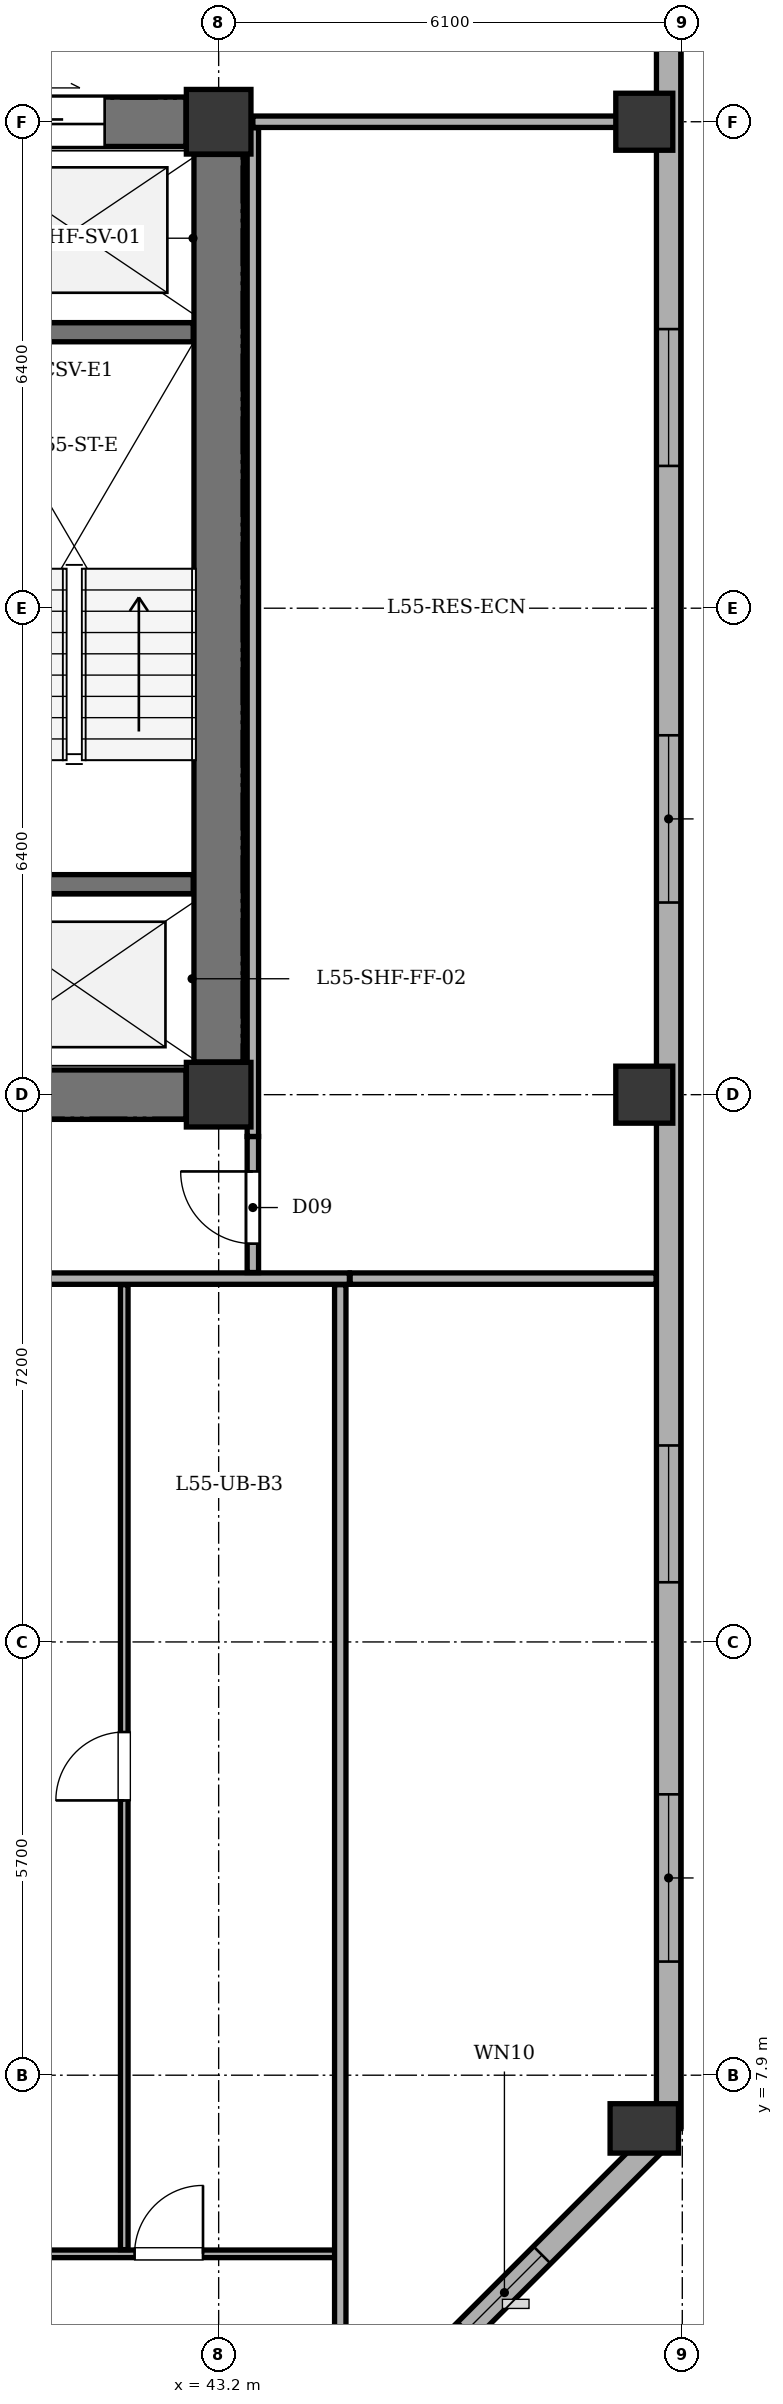
"""IFC4 building model, lengths in metres.
Left out: names, types, materials, properties, quantities, classifications, styles, units other than length and angle.
Written with IfcOpenShell. Run it as: python <this file> out.ifc"""

import sys

from ifc_helpers import new_model, si_unit, direction, frame, frame_2d, origin, origin_2d, place, context, subcontext, project, spatial, rectangle, extrude, element, fill, save


model = new_model("IFC4")
c1 = context("Model", 3, precision=1e-05, world=origin(), true_north=direction((0.0, 1.0)))
c2 = subcontext(c1, "Body", "Model", "MODEL_VIEW")
j1 = project(units=[si_unit("LENGTHUNIT", "METRE"), si_unit("PLANEANGLEUNIT", "RADIAN")], contexts=[c1])
p1 = place(None, origin())
s1 = spatial("IfcSite", under=j1, at=p1, CompositionType="ELEMENT")
p2 = place(p1, origin())
s2 = spatial("IfcBuilding", under=s1, at=p2, CompositionType="ELEMENT")
p3 = place(p2, frame((0.0, 0.0, 214.3)))
s3 = spatial("IfcBuildingStorey", under=s2, at=p3, CompositionType="ELEMENT", Elevation=214.3)
for number, where, z_axis, x_axis in (
    (1, (43.2, 20.8, 0.0), (0.0, 0.0, 1.0), (1.0, 0.0, 0.0)),
    (2, (43.2, 33.6, 0.0), (0.0, 0.0, 1.0), (1.0, 0.0, 0.0)),
):
    element("IfcColumn", number, at=place(p3, frame(where, z_axis=z_axis, x_axis=x_axis)), inside=s3, PredefinedType="COLUMN", context=c2, shape_type="SweptSolid", body=[
        extrude(rectangle(XDim=0.85, YDim=0.85, at=origin_2d()), origin(), (0.0, 0.0, 1.0), 3.4),
    ])
p4 = place(p3, frame((48.8, 7.2, 0.0), z_axis=(0.0, 0.0, 1.0), x_axis=(1.0, 0.0, 0.0)))
e3 = element("IfcColumn", 3, at=p4, inside=s3, PredefinedType="COLUMN", context=c2, shape_type="SweptSolid", body=[
    extrude(rectangle(XDim=0.65, YDim=0.9, at=origin_2d()), origin(), (0.0, 0.0, 1.0), 3.4),
])
for number, where, z_axis, x_axis in (
    (4, (48.8, 20.8, 0.0), (0.0, 0.0, 1.0), (1.0, 0.0, 0.0)),
    (5, (48.8, 33.6, 0.0), (0.0, 0.0, 1.0), (1.0, 0.0, 0.0)),
):
    element("IfcColumn", number, at=place(p3, frame(where, z_axis=z_axis, x_axis=x_axis)), inside=s3, PredefinedType="COLUMN", context=c2, shape_type="SweptSolid", body=[
        extrude(rectangle(XDim=0.75, YDim=0.75, at=origin_2d()), origin(), (0.0, 0.0, 1.0), 3.4),
    ])
p5 = place(p3, frame((49.12, 35.0, 0.0), z_axis=(0.0, 0.0, 1.0), x_axis=(0.0, -1.0, 0.0)))
e6 = element("IfcWall", 6, at=p5, inside=s3, PredefinedType="STANDARD", context=c2, shape_type="SweptSolid", body=[
    extrude(rectangle(XDim=27.8, YDim=0.32, at=frame_2d((13.9, 0.0))), origin(), (0.0, 0.0, 1.0), 2.725),
])
p6 = place(p5, frame((4.128, 0.0, 0.75)))
e7 = element("IfcOpeningElement", 7, at=p6, cuts=e6, PredefinedType="OPENING", context=c2, shape_type="SweptSolid", body=[
    extrude(rectangle(XDim=1.8, YDim=1.7, at=frame_2d((0.9, 0.85))), frame((0.0, 0.17, 0.0), z_axis=(0.0, -1.0, 0.0), x_axis=(1.0, 0.0, 0.0)), (0.0, 0.0, 1.0), 0.34),
])
p7 = place(p5, frame((9.472, 0.0, 0.75)))
e8 = element("IfcOpeningElement", 8, at=p7, cuts=e6, PredefinedType="OPENING", context=c2, shape_type="SweptSolid", body=[
    extrude(rectangle(XDim=2.2, YDim=1.7, at=frame_2d((1.1, 0.85))), frame((0.0, 0.17, 0.0), z_axis=(0.0, -1.0, 0.0), x_axis=(1.0, 0.0, 0.0)), (0.0, 0.0, 1.0), 0.34),
])
p8 = place(p5, frame((18.815, 0.0, 0.75)))
e9 = element("IfcOpeningElement", 9, at=p8, cuts=e6, PredefinedType="OPENING", context=c2, shape_type="SweptSolid", body=[
    extrude(rectangle(XDim=1.8, YDim=1.7, at=frame_2d((0.9, 0.85))), frame((0.0, 0.17, 0.0), z_axis=(0.0, -1.0, 0.0), x_axis=(1.0, 0.0, 0.0)), (0.0, 0.0, 1.0), 0.34),
])
p9 = place(p5, frame((23.405, 0.0, 0.75)))
e10 = element("IfcOpeningElement", 10, at=p9, cuts=e6, PredefinedType="OPENING", context=c2, shape_type="SweptSolid", body=[
    extrude(rectangle(XDim=2.2, YDim=1.7, at=frame_2d((1.1, 0.85))), frame((0.0, 0.17, 0.0), z_axis=(0.0, -1.0, 0.0), x_axis=(1.0, 0.0, 0.0)), (0.0, 0.0, 1.0), 0.34),
])
p10 = place(p3, frame((49.12, 7.2, 0.0), z_axis=(0.0, 0.0, 1.0), x_axis=(-0.707106781187, -0.707106781187, 0.0)))
e11 = element("IfcWall", 11, at=p10, inside=s3, PredefinedType="STANDARD", context=c2, shape_type="SweptSolid", body=[
    extrude(rectangle(XDim=6.11, YDim=0.32, at=frame_2d((3.055, 0.0))), origin(), (0.0, 0.0, 1.0), 2.725),
])
p11 = place(p10, frame((2.355, 0.0, 0.75)))
e12 = element("IfcOpeningElement", 12, at=p11, cuts=e11, PredefinedType="OPENING", context=c2, shape_type="SweptSolid", body=[
    extrude(rectangle(XDim=1.4, YDim=1.65, at=frame_2d((0.7, 0.825))), frame((0.0, 0.17, 0.0), z_axis=(0.0, -1.0, 0.0), x_axis=(1.0, 0.0, 0.0)), (0.0, 0.0, 1.0), 0.34),
])
p12 = place(p3, frame((43.2, 21.23, 0.0), z_axis=(0.0, 0.0, 1.0), x_axis=(0.0, 1.0, 0.0)))
e13 = element("IfcWall", 13, at=p12, inside=s3, PredefinedType="SHEAR", context=c2, shape_type="SweptSolid", body=[
    extrude(rectangle(XDim=11.94, YDim=0.65, at=frame_2d((5.97, 0.0))), origin(), (0.0, 0.0, 1.0), 3.1),
])
p13 = place(p3, frame((35.63, 20.8, 0.0), z_axis=(0.0, 0.0, 1.0), x_axis=(1.0, 0.0, 0.0)))
e14 = element("IfcWall", 14, at=p13, inside=s3, PredefinedType="SHEAR", context=c2, shape_type="SweptSolid", body=[
    extrude(rectangle(XDim=7.14, YDim=0.65, at=frame_2d((3.57, 0.0))), origin(), (0.0, 0.0, 1.0), 3.1),
])
p14 = place(p3, frame((35.63, 33.6, 0.0), z_axis=(0.0, 0.0, 1.0), x_axis=(1.0, 0.0, 0.0)))
e15 = element("IfcWall", 15, at=p14, inside=s3, PredefinedType="SHEAR", context=c2, shape_type="SweptSolid", body=[
    extrude(rectangle(XDim=7.14, YDim=0.65, at=frame_2d((3.57, 0.0))), origin(), (0.0, 0.0, 1.0), 3.1),
])
p15 = place(p14, frame((4.77, 0.0, 0.0)))
e16 = element("IfcOpeningElement", 16, at=p15, cuts=e15, PredefinedType="OPENING", context=c2, shape_type="SweptSolid", body=[
    extrude(rectangle(XDim=1.3, YDim=2.15, at=frame_2d((0.65, 1.075))), frame((0.0, 0.335, 0.0), z_axis=(0.0, -1.0, 0.0), x_axis=(1.0, 0.0, 0.0)), (0.0, 0.0, 1.0), 0.67),
])
p16 = place(p14, frame((2.57, 0.0, 0.0)))
e17 = element("IfcOpeningElement", 17, at=p16, cuts=e15, PredefinedType="OPENING", context=c2, shape_type="SweptSolid", body=[
    extrude(rectangle(XDim=0.85, YDim=2.02, at=frame_2d((0.425, 1.01))), frame((0.0, 0.335, 0.0), z_axis=(0.0, -1.0, 0.0), x_axis=(1.0, 0.0, 0.0)), (0.0, 0.0, 1.0), 0.67),
])
for number, where, z_axis, x_axis in (
    (18, (39.69, 23.57, 0.0), (0.0, 0.0, 1.0), (1.0, 0.0, 0.0)),
    (19, (39.69, 30.83, 0.0), (0.0, 0.0, 1.0), (1.0, 0.0, 0.0)),
):
    element("IfcWall", number, at=place(p3, frame(where, z_axis=z_axis, x_axis=x_axis)), inside=s3, PredefinedType="SHEAR", context=c2, shape_type="SweptSolid", body=[
        extrude(rectangle(XDim=3.175, YDim=0.25, at=frame_2d((1.587, 0.0))), origin(), (0.0, 0.0, 1.0), 3.1),
    ])
p17 = place(p3, frame((10.9, 18.38, 0.0), z_axis=(0.0, 0.0, 1.0), x_axis=(1.0, 0.0, 0.0)))
e20 = element("IfcWall", 20, at=p17, inside=s3, PredefinedType="PARTITIONING", context=c2, shape_type="SweptSolid", body=[
    extrude(rectangle(XDim=34.02, YDim=0.15, at=frame_2d((17.01, 0.0))), origin(), (0.0, 0.0, 1.0), 3.1),
])
p18 = place(p17, frame((7.727, 0.0, 0.0)))
e21 = element("IfcOpeningElement", 21, at=p18, cuts=e20, PredefinedType="OPENING", context=c2, shape_type="SweptSolid", body=[
    extrude(rectangle(XDim=1.0, YDim=2.1, at=frame_2d((0.5, 1.05))), frame((0.0, 0.085, 0.0), z_axis=(0.0, -1.0, 0.0), x_axis=(1.0, 0.0, 0.0)), (0.0, 0.0, 1.0), 0.17),
])
p19 = place(p17, frame((24.617, 0.0, 0.0)))
e22 = element("IfcOpeningElement", 22, at=p19, cuts=e20, PredefinedType="OPENING", context=c2, shape_type="SweptSolid", body=[
    extrude(rectangle(XDim=1.0, YDim=2.1, at=frame_2d((0.5, 1.05))), frame((0.0, 0.085, 0.0), z_axis=(0.0, -1.0, 0.0), x_axis=(1.0, 0.0, 0.0)), (0.0, 0.0, 1.0), 0.17),
])
p20 = place(p3, frame((27.314, 5.55, 0.0), z_axis=(0.0, 0.0, 1.0), x_axis=(1.0, 0.0, 0.0)))
e23 = element("IfcWall", 23, at=p20, inside=s3, PredefinedType="PARTITIONING", context=c2, shape_type="SweptSolid", body=[
    extrude(rectangle(XDim=17.526, YDim=0.1, at=frame_2d((8.763, 0.0))), origin(), (0.0, 0.0, 1.0), 3.1),
])
p21 = place(p20, frame((0.65, 0.0, 0.0)))
e24 = element("IfcOpeningElement", 24, at=p21, cuts=e23, PredefinedType="OPENING", context=c2, shape_type="SweptSolid", body=[
    extrude(rectangle(XDim=0.85, YDim=2.05, at=frame_2d((0.425, 1.025))), frame((0.0, 0.06, 0.0), z_axis=(0.0, -1.0, 0.0), x_axis=(1.0, 0.0, 0.0)), (0.0, 0.0, 1.0), 0.12),
])
p22 = place(p20, frame((5.001, 0.0, 0.0)))
e25 = element("IfcOpeningElement", 25, at=p22, cuts=e23, PredefinedType="OPENING", context=c2, shape_type="SweptSolid", body=[
    extrude(rectangle(XDim=0.85, YDim=2.05, at=frame_2d((0.425, 1.025))), frame((0.0, 0.06, 0.0), z_axis=(0.0, -1.0, 0.0), x_axis=(1.0, 0.0, 0.0)), (0.0, 0.0, 1.0), 0.12),
])
p23 = place(p20, frame((10.428, 0.0, 0.0)))
e26 = element("IfcOpeningElement", 26, at=p23, cuts=e23, PredefinedType="OPENING", context=c2, shape_type="SweptSolid", body=[
    extrude(rectangle(XDim=0.9, YDim=2.05, at=frame_2d((0.45, 1.025))), frame((0.0, 0.06, 0.0), z_axis=(0.0, -1.0, 0.0), x_axis=(1.0, 0.0, 0.0)), (0.0, 0.0, 1.0), 0.12),
])
p24 = place(p20, frame((14.78, 0.0, 0.0)))
e27 = element("IfcOpeningElement", 27, at=p24, cuts=e23, PredefinedType="OPENING", context=c2, shape_type="SweptSolid", body=[
    extrude(rectangle(XDim=0.9, YDim=2.05, at=frame_2d((0.45, 1.025))), frame((0.0, 0.06, 0.0), z_axis=(0.0, -1.0, 0.0), x_axis=(1.0, 0.0, 0.0)), (0.0, 0.0, 1.0), 0.12),
])
p25 = place(p3, frame((41.958, 5.605, 0.0), z_axis=(0.0, 0.0, 1.0), x_axis=(0.0, 1.0, 0.0)))
e28 = element("IfcWall", 28, at=p25, inside=s3, PredefinedType="PARTITIONING", context=c2, shape_type="SweptSolid", body=[
    extrude(rectangle(XDim=12.695, YDim=0.1, at=frame_2d((6.348, 0.0))), origin(), (0.0, 0.0, 1.0), 2.725),
])
p26 = place(p25, frame((5.91, 0.0, 0.0)))
e29 = element("IfcOpeningElement", 29, at=p26, cuts=e28, PredefinedType="OPENING", context=c2, shape_type="SweptSolid", body=[
    extrude(rectangle(XDim=0.9, YDim=2.05, at=frame_2d((0.45, 1.025))), frame((0.0, 0.06, 0.0), z_axis=(0.0, -1.0, 0.0), x_axis=(1.0, 0.0, 0.0)), (0.0, 0.0, 1.0), 0.12),
])
p27 = place(p3, frame((44.8, 3.045, 0.0), z_axis=(0.0, 0.0, 1.0), x_axis=(0.0, 1.0, 0.0)))
e30 = element("IfcWall", 30, at=p27, inside=s3, PredefinedType="PARTITIONING", context=c2, shape_type="SweptSolid", body=[
    extrude(rectangle(XDim=15.255, YDim=0.15, at=frame_2d((7.627, 0.0))), origin(), (0.0, 0.0, 1.0), 3.1),
])
p28 = place(p3, frame((44.93, 18.38, 0.0), z_axis=(0.0, 0.0, 1.0), x_axis=(1.0, 0.0, 0.0)))
e31 = element("IfcWall", 31, at=p28, inside=s3, PredefinedType="PARTITIONING", context=c2, shape_type="SweptSolid", body=[
    extrude(rectangle(XDim=4.025, YDim=0.15, at=frame_2d((2.013, 0.0))), origin(), (0.0, 0.0, 1.0), 3.1),
])
p29 = place(p3, frame((43.65, 33.6, 0.0), z_axis=(0.0, 0.0, 1.0), x_axis=(1.0, 0.0, 0.0)))
e32 = element("IfcWall", 32, at=p29, inside=s3, PredefinedType="PARTITIONING", context=c2, shape_type="SweptSolid", body=[
    extrude(rectangle(XDim=5.305, YDim=0.15, at=frame_2d((2.653, 0.0))), origin(), (0.0, 0.0, 1.0), 2.535),
])
p30 = place(p3, frame((43.65, 18.46, 0.0), z_axis=(0.0, 0.0, 1.0), x_axis=(0.0, 1.0, 0.0)))
e33 = element("IfcWall", 33, at=p30, inside=s3, PredefinedType="PARTITIONING", context=c2, shape_type="SweptSolid", body=[
    extrude(rectangle(XDim=1.79, YDim=0.15, at=frame_2d((0.895, 0.0))), origin(), (0.0, 0.0, 1.0), 3.1),
])
p31 = place(p30, frame((0.38, 0.0, 0.0)))
e34 = element("IfcOpeningElement", 34, at=p31, cuts=e33, PredefinedType="OPENING", context=c2, shape_type="SweptSolid", body=[
    extrude(rectangle(XDim=0.95, YDim=2.1, at=frame_2d((0.475, 1.05))), frame((0.0, 0.085, 0.0), z_axis=(0.0, -1.0, 0.0), x_axis=(1.0, 0.0, 0.0)), (0.0, 0.0, 1.0), 0.17),
])
p32 = place(p3, frame((43.65, 20.25, 0.0), z_axis=(0.0, 0.0, 1.0), x_axis=(0.0, 1.0, 0.0)))
e35 = element("IfcWall", 35, at=p32, inside=s3, PredefinedType="PARTITIONING", context=c2, shape_type="SweptSolid", body=[
    extrude(rectangle(XDim=13.27, YDim=0.15, at=frame_2d((6.635, 0.0))), origin(), (0.0, 0.0, 1.0), 3.1),
])
p33 = place(p6, origin())
e36 = element("IfcWindow", 36, at=p33, inside=s3, PartitioningType="SINGLE_PANEL", PredefinedType="WINDOW", context=c2, shape_type="SweptSolid", body=[
    extrude(rectangle(XDim=1.8, YDim=1.7, at=frame_2d((0.9, 0.85))), frame((0.0, -0.01, 0.0), z_axis=(0.0, -1.0, 0.0), x_axis=(1.0, 0.0, 0.0)), (0.0, 0.0, 1.0), 0.06),
])
fill(e7, e36)
p34 = place(p7, origin())
e37 = element("IfcWindow", 37, at=p34, inside=s3, PartitioningType="SINGLE_PANEL", PredefinedType="WINDOW", context=c2, shape_type="SweptSolid", body=[
    extrude(rectangle(XDim=2.2, YDim=1.7, at=frame_2d((1.1, 0.85))), frame((0.0, -0.01, 0.0), z_axis=(0.0, -1.0, 0.0), x_axis=(1.0, 0.0, 0.0)), (0.0, 0.0, 1.0), 0.06),
])
fill(e8, e37)
p35 = place(p8, origin())
e38 = element("IfcWindow", 38, at=p35, inside=s3, PartitioningType="SINGLE_PANEL", PredefinedType="WINDOW", context=c2, shape_type="SweptSolid", body=[
    extrude(rectangle(XDim=1.8, YDim=1.7, at=frame_2d((0.9, 0.85))), frame((0.0, -0.01, 0.0), z_axis=(0.0, -1.0, 0.0), x_axis=(1.0, 0.0, 0.0)), (0.0, 0.0, 1.0), 0.06),
])
fill(e9, e38)
p36 = place(p9, origin())
e39 = element("IfcWindow", 39, at=p36, inside=s3, PartitioningType="SINGLE_PANEL", PredefinedType="WINDOW", context=c2, shape_type="SweptSolid", body=[
    extrude(rectangle(XDim=2.2, YDim=1.7, at=frame_2d((1.1, 0.85))), frame((0.0, -0.01, 0.0), z_axis=(0.0, -1.0, 0.0), x_axis=(1.0, 0.0, 0.0)), (0.0, 0.0, 1.0), 0.06),
])
fill(e10, e39)
p37 = place(p11, origin())
e40 = element("IfcWindow", 40, at=p37, inside=s3, PartitioningType="SINGLE_PANEL", PredefinedType="WINDOW", context=c2, shape_type="SweptSolid", body=[
    extrude(rectangle(XDim=1.4, YDim=1.65, at=frame_2d((0.7, 0.825))), frame((0.0, -0.01, 0.0), z_axis=(0.0, -1.0, 0.0), x_axis=(1.0, 0.0, 0.0)), (0.0, 0.0, 1.0), 0.06),
])
fill(e12, e40)
p38 = place(p15, origin())
e41 = element("IfcDoor", 41, at=p38, inside=s3, OperationType="DOUBLE_DOOR_SLIDING", PredefinedType="DOOR", context=c2, shape_type="SweptSolid", body=[
    extrude(rectangle(XDim=1.3, YDim=2.15, at=frame_2d((0.65, 1.075))), frame((0.0, 0.025, 0.0), z_axis=(0.0, -1.0, 0.0), x_axis=(1.0, 0.0, 0.0)), (0.0, 0.0, 1.0), 0.05),
])
fill(e16, e41)
p39 = place(p26, origin())
e42 = element("IfcDoor", 42, at=p39, inside=s3, OperationType="SINGLE_SWING_LEFT", PredefinedType="DOOR", context=c2, shape_type="SweptSolid", body=[
    extrude(rectangle(XDim=0.9, YDim=2.05, at=frame_2d((0.45, 1.025))), frame((0.0, 0.025, 0.0), z_axis=(0.0, -1.0, 0.0), x_axis=(1.0, 0.0, 0.0)), (0.0, 0.0, 1.0), 0.05),
])
fill(e29, e42)
p40 = place(p24, origin())
e43 = element("IfcDoor", 43, at=p40, inside=s3, OperationType="SINGLE_SWING_RIGHT", PredefinedType="DOOR", context=c2, shape_type="SweptSolid", body=[
    extrude(rectangle(XDim=0.9, YDim=2.05, at=frame_2d((0.45, 1.025))), frame((0.0, 0.025, 0.0), z_axis=(0.0, -1.0, 0.0), x_axis=(1.0, 0.0, 0.0)), (0.0, 0.0, 1.0), 0.05),
])
fill(e27, e43)
p41 = place(p31, origin())
e44 = element("IfcDoor", 44, at=p41, inside=s3, OperationType="SINGLE_SWING_RIGHT", PredefinedType="DOOR", context=c2, shape_type="SweptSolid", body=[
    extrude(rectangle(XDim=0.95, YDim=2.1, at=frame_2d((0.475, 1.05))), frame((0.0, 0.025, 0.0), z_axis=(0.0, -1.0, 0.0), x_axis=(1.0, 0.0, 0.0)), (0.0, 0.0, 1.0), 0.05),
])
fill(e34, e44)
save(model, sys.argv[1])
